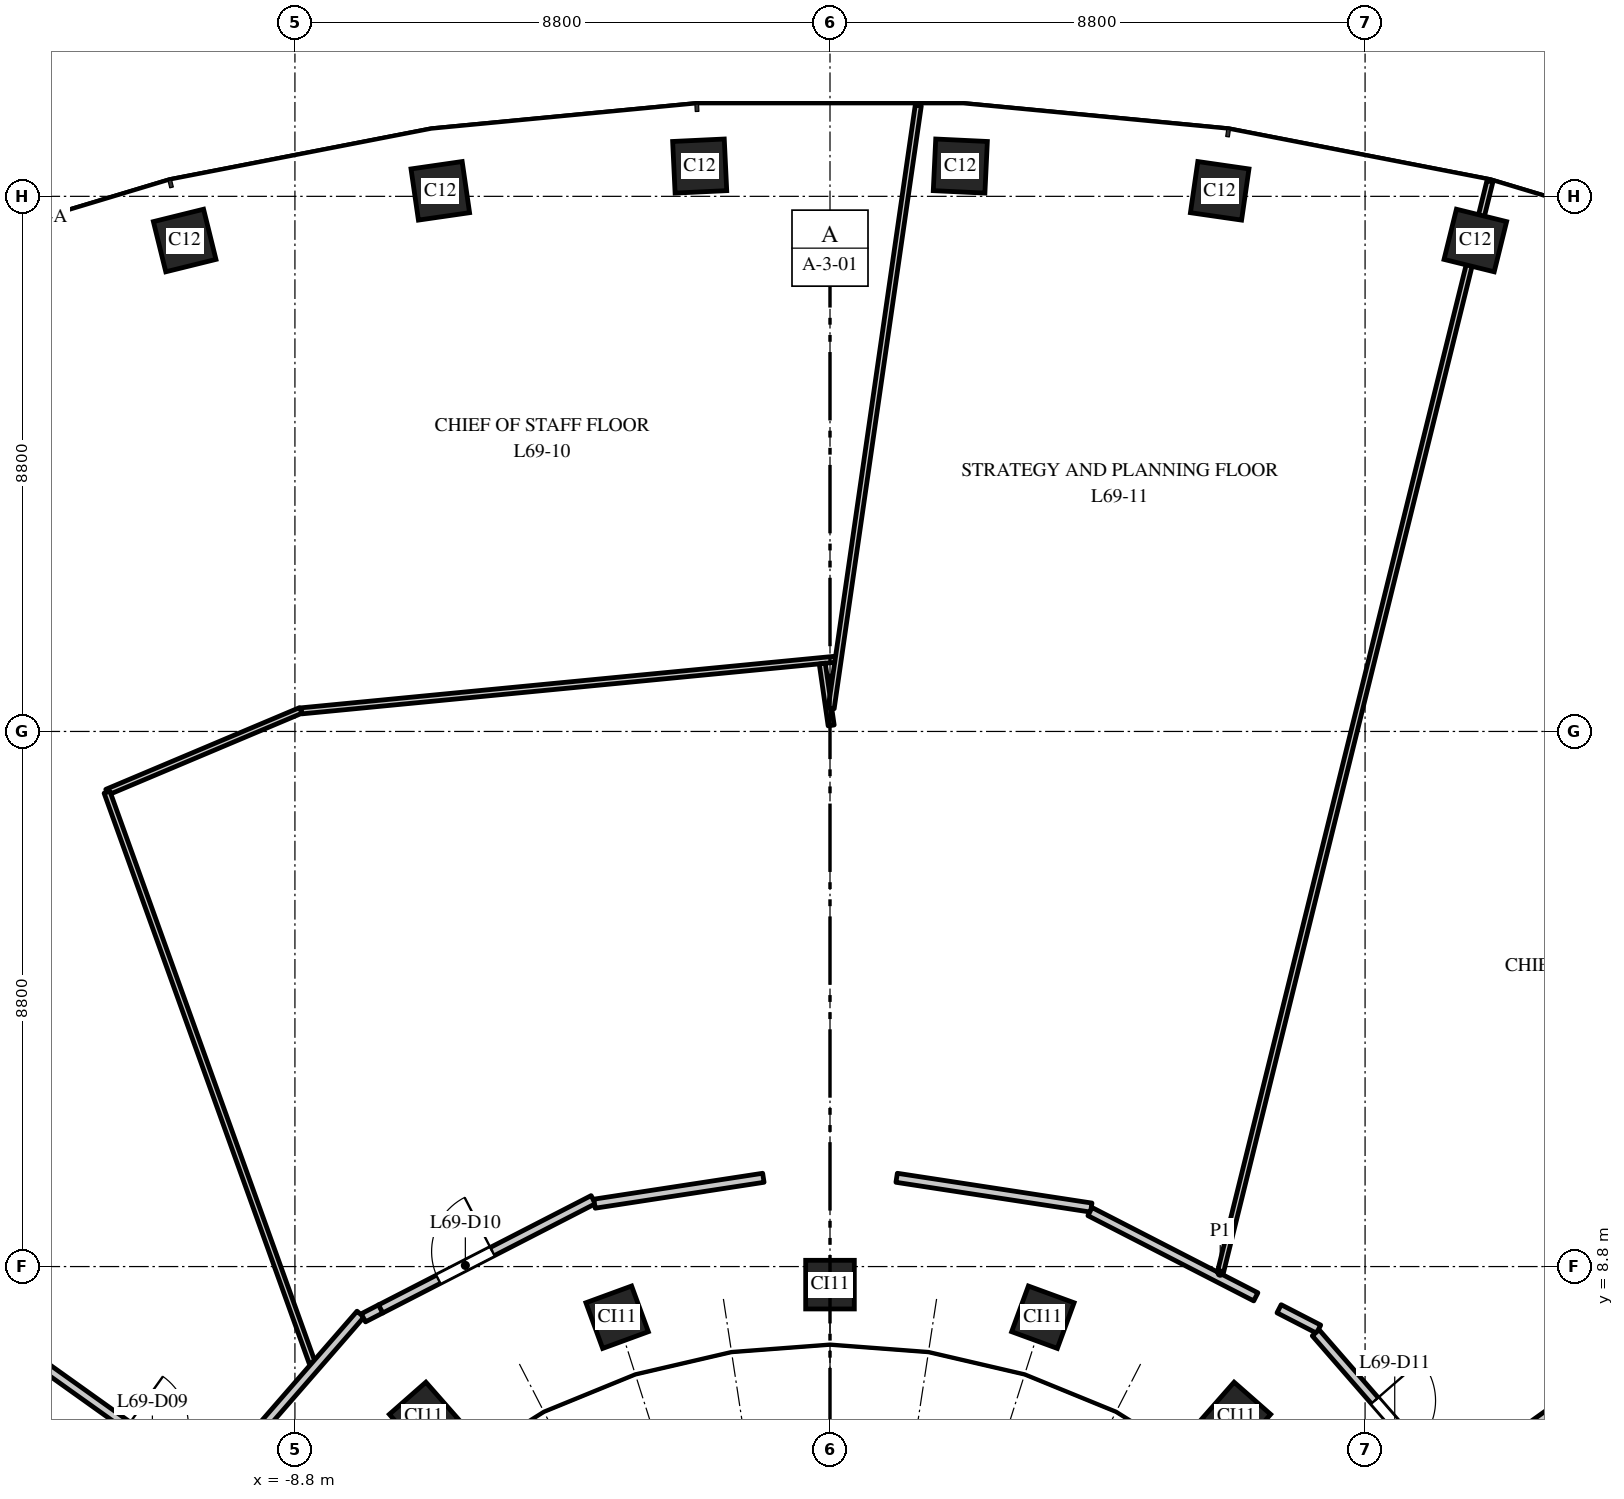
"""IFC4 building model, lengths in metres.
Left out: names, types, materials, properties, quantities, classifications, styles, units other than length and angle.
Written with IfcOpenShell. Run it as: python <this file> out.ifc"""

import sys

from ifc_helpers import new_model, si_unit, direction, frame, frame_2d, origin, origin_2d, place, context, subcontext, project, spatial, rectangle, extrude, element, fill, save


model = new_model("IFC4")
c1 = context("Model", 3, precision=1e-05, world=origin(), true_north=direction((0.0, 1.0)))
c2 = subcontext(c1, "Body", "Model", "MODEL_VIEW")
j1 = project(units=[si_unit("LENGTHUNIT", "METRE"), si_unit("PLANEANGLEUNIT", "RADIAN")], contexts=[c1])
p1 = place(None, origin())
s1 = spatial("IfcSite", under=j1, at=p1, CompositionType="ELEMENT")
p2 = place(p1, origin())
s2 = spatial("IfcBuilding", under=s1, at=p2, CompositionType="ELEMENT")
p3 = place(p2, frame((0.0, 0.0, 319.0)))
s3 = spatial("IfcBuildingStorey", under=s2, at=p3, CompositionType="ELEMENT", Elevation=319.0)
for number, where, z_axis, x_axis in (
    (1, (10.613, 25.674, 0.0), (0.0, 0.0, 1.0), (-0.971, 0.24, 0.0)),
    (2, (6.409, 26.491, 0.0), (0.0, 0.0, 1.0), (-0.99, 0.143, 0.0)),
    (3, (2.143, 26.898, 0.0), (0.0, 0.0, 1.0), (-0.999, 0.048, 0.0)),
    (4, (-2.143, 26.898, 0.0), (0.0, 0.0, 1.0), (-0.999, -0.048, 0.0)),
    (5, (-6.409, 26.491, 0.0), (0.0, 0.0, 1.0), (-0.99, -0.143, 0.0)),
    (6, (-10.613, 25.674, 0.0), (0.0, 0.0, 1.0), (-0.971, -0.24, 0.0)),
):
    element("IfcColumn", number, at=place(p3, frame(where, z_axis=z_axis, x_axis=x_axis)), inside=s3, PredefinedType="COLUMN", context=c2, shape_type="SweptSolid", body=[
        extrude(rectangle(XDim=0.85, YDim=0.85, at=origin_2d()), origin(), (0.0, 0.0, 1.0), 4.0),
    ])
for number, where, z_axis, x_axis in (
    (7, (6.682, 6.334, 0.0), (0.0, 0.0, 1.0), (-0.751, 0.66, 0.0)),
    (8, (3.501, 7.967, 0.0), (0.0, 0.0, 1.0), (-0.939, 0.344, 0.0)),
    (9, (0.0, 8.503, 0.0), (0.0, 0.0, 1.0), (-1.0, 0.0, 0.0)),
    (10, (-3.501, 7.967, 0.0), (0.0, 0.0, 1.0), (-0.939, -0.344, 0.0)),
    (11, (-6.682, 6.334, 0.0), (0.0, 0.0, 1.0), (-0.751, -0.66, 0.0)),
):
    element("IfcColumn", number, at=place(p3, frame(where, z_axis=z_axis, x_axis=x_axis)), inside=s3, PredefinedType="COLUMN", context=c2, shape_type="SweptSolid", body=[
        extrude(rectangle(XDim=0.8, YDim=0.8, at=origin_2d()), origin(), (0.0, 0.0, 1.0), 4.0),
    ])
p4 = place(p3, frame((-16.5, 7.744, 0.0), z_axis=(0.0, 0.0, 1.0), x_axis=(0.814095150002, -0.580731510032, 0.0)))
e12 = element("IfcWall", 12, at=p4, inside=s3, PredefinedType="PARTITIONING", context=c2, shape_type="SweptSolid", body=[
    extrude(rectangle(XDim=6.793, YDim=0.15, at=frame_2d((3.396, 0.0))), origin(), (0.0, 0.0, 1.0), 3.7),
])
p5 = place(p4, frame((3.776, 0.0, 0.0)))
e13 = element("IfcOpeningElement", 13, at=p5, cuts=e12, PredefinedType="OPENING", context=c2, shape_type="SweptSolid", body=[
    extrude(rectangle(XDim=1.0, YDim=2.1, at=frame_2d((0.5, 1.05))), frame((0.0, 0.085, 0.0), z_axis=(0.0, -1.0, 0.0), x_axis=(1.0, 0.0, 0.0)), (0.0, 0.0, 1.0), 0.17),
])
p6 = place(p3, frame((-15.063, 8.684, 0.0), z_axis=(0.0, 0.0, 1.0), x_axis=(0.814106730479, -0.580715275663, 0.0)))
e14 = element("IfcWall", 14, at=p6, inside=s3, PredefinedType="PARTITIONING", context=c2, shape_type="SweptSolid", body=[
    extrude(rectangle(XDim=5.964, YDim=0.15, at=frame_2d((2.982, 0.0))), origin(), (0.0, 0.0, 1.0), 3.7),
])
p7 = place(p6, frame((4.313, 0.0, 0.0)))
e15 = element("IfcOpeningElement", 15, at=p7, cuts=e14, PredefinedType="OPENING", context=c2, shape_type="SweptSolid", body=[
    extrude(rectangle(XDim=1.0, YDim=2.1, at=frame_2d((0.5, 1.05))), frame((0.0, 0.085, 0.0), z_axis=(0.0, -1.0, 0.0), x_axis=(1.0, 0.0, 0.0)), (0.0, 0.0, 1.0), 0.17),
])
p8 = place(p3, frame((-11.891, 16.602, 0.0), z_axis=(0.0, 0.0, 1.0), x_axis=(0.921418659734, 0.388571297827, 0.0)))
e16 = element("IfcWall", 16, at=p8, inside=s3, PredefinedType="PARTITIONING", context=c2, shape_type="SweptSolid", body=[
    extrude(rectangle(XDim=3.459, YDim=0.1, at=frame_2d((1.729, 0.0))), origin(), (0.0, 0.0, 1.0), 3.7),
])
p9 = place(p3, frame((-11.891, 16.602, 0.0), z_axis=(0.0, 0.0, 1.0), x_axis=(0.338375241261, -0.941011262473, 0.0)))
e17 = element("IfcWall", 17, at=p9, inside=s3, PredefinedType="PARTITIONING", context=c2, shape_type="SweptSolid", body=[
    extrude(rectangle(XDim=9.971, YDim=0.1, at=frame_2d((4.986, 0.0))), origin(), (0.0, 0.0, 1.0), 2.75),
])
p10 = place(p3, frame((-10.043, 5.351, 0.0), z_axis=(0.0, 0.0, 1.0), x_axis=(0.656624899746, 0.754217303589, 0.0)))
e18 = element("IfcWall", 18, at=p10, inside=s3, PredefinedType="PARTITIONING", context=c2, shape_type="SweptSolid", body=[
    extrude(rectangle(XDim=3.535, YDim=0.15, at=frame_2d((1.768, 0.0))), origin(), (0.0, 0.0, 1.0), 2.75),
])
p11 = place(p3, frame((-8.691, 17.939, 0.0), z_axis=(0.0, 0.0, 1.0), x_axis=(0.995363362458, 0.096186156361, 0.0)))
e19 = element("IfcWall", 19, at=p11, inside=s3, PredefinedType="PARTITIONING", context=c2, shape_type="SweptSolid", body=[
    extrude(rectangle(XDim=8.818, YDim=0.1, at=frame_2d((4.409, 0.0))), origin(), (0.0, 0.0, 1.0), 2.85),
])
p12 = place(p3, frame((-7.674, 7.957, 0.0), z_axis=(0.0, 0.0, 1.0), x_axis=(0.888323550582, 0.459218106657, 0.0)))
e20 = element("IfcWall", 20, at=p12, inside=s3, PredefinedType="PARTITIONING", context=c2, shape_type="SweptSolid", body=[
    extrude(rectangle(XDim=0.324, YDim=0.15, at=frame_2d((0.162, 0.0))), origin(), (0.0, 0.0, 1.0), 3.7),
])
p13 = place(p3, frame((-7.39, 8.103, 0.0), z_axis=(0.0, 0.0, 1.0), x_axis=(0.889390271787, 0.457148711527, 0.0)))
e21 = element("IfcWall", 21, at=p13, inside=s3, PredefinedType="PARTITIONING", context=c2, shape_type="SweptSolid", body=[
    extrude(rectangle(XDim=3.931, YDim=0.15, at=frame_2d((1.965, 0.0))), origin(), (0.0, 0.0, 1.0), 2.75),
])
p14 = place(p13, frame((1.066, 0.0, 0.0)))
e22 = element("IfcOpeningElement", 22, at=p14, cuts=e21, PredefinedType="OPENING", context=c2, shape_type="SweptSolid", body=[
    extrude(rectangle(XDim=1.0, YDim=2.1, at=frame_2d((0.5, 1.05))), frame((0.0, 0.085, 0.0), z_axis=(0.0, -1.0, 0.0), x_axis=(1.0, 0.0, 0.0)), (0.0, 0.0, 1.0), 0.17),
])
p15 = place(p3, frame((-3.873, 9.834, 0.0), z_axis=(0.0, 0.0, 1.0), x_axis=(0.988436903755, 0.151632738202, 0.0)))
e23 = element("IfcWall", 23, at=p15, inside=s3, PredefinedType="PARTITIONING", context=c2, shape_type="SweptSolid", body=[
    extrude(rectangle(XDim=2.81, YDim=0.15, at=frame_2d((1.405, 0.0))), origin(), (0.0, 0.0, 1.0), 3.7),
])
p16 = place(p3, frame((-0.127, 18.716, 0.0), z_axis=(0.0, 0.0, 1.0), x_axis=(0.142086612789, -0.989854228897, 0.0)))
e24 = element("IfcWall", 24, at=p16, inside=s3, PredefinedType="PARTITIONING", context=c2, shape_type="SweptSolid", body=[
    extrude(rectangle(XDim=1.028, YDim=0.1, at=frame_2d((0.514, 0.0))), origin(), (0.0, 0.0, 1.0), 3.7),
])
p17 = place(p3, frame((0.019, 17.981, 0.0), z_axis=(0.0, 0.0, 1.0), x_axis=(0.143055737962, 0.989714633536, 0.0)))
e25 = element("IfcWall", 25, at=p17, inside=s3, PredefinedType="PARTITIONING", context=c2, shape_type="SweptSolid", body=[
    extrude(rectangle(XDim=10.016, YDim=0.1, at=frame_2d((5.008, 0.0))), origin(), (0.0, 0.0, 1.0), 3.0),
])
p18 = place(p3, frame((1.096, 10.26, 0.0), z_axis=(0.0, 0.0, 1.0), x_axis=(0.988487324954, -0.151303695941, 0.0)))
e26 = element("IfcWall", 26, at=p18, inside=s3, PredefinedType="PARTITIONING", context=c2, shape_type="SweptSolid", body=[
    extrude(rectangle(XDim=3.239, YDim=0.15, at=frame_2d((1.619, 0.0))), origin(), (0.0, 0.0, 1.0), 2.85),
])
p19 = place(p3, frame((4.276, 9.704, 0.0), z_axis=(0.0, 0.0, 1.0), x_axis=(0.889338682752, -0.45724906491, 0.0)))
e27 = element("IfcWall", 27, at=p19, inside=s3, PredefinedType="PARTITIONING", context=c2, shape_type="SweptSolid", body=[
    extrude(rectangle(XDim=3.066, YDim=0.15, at=frame_2d((1.533, 0.0))), origin(), (0.0, 0.0, 1.0), 2.85),
])
p20 = place(p3, frame((6.418, 8.692, 0.0), z_axis=(0.0, 0.0, 1.0), x_axis=(0.239813663249, 0.970818936218, 0.0)))
e28 = element("IfcWall", 28, at=p20, inside=s3, PredefinedType="PARTITIONING", context=c2, shape_type="SweptSolid", body=[
    extrude(rectangle(XDim=18.494, YDim=0.1, at=frame_2d((9.247, 0.0))), origin(), (0.0, 0.0, 1.0), 2.85),
])
p21 = place(p3, frame((7.386, 8.106, 0.0), z_axis=(0.0, 0.0, 1.0), x_axis=(0.888883911649, -0.458132504426, 0.0)))
e29 = element("IfcWall", 29, at=p21, inside=s3, PredefinedType="PARTITIONING", context=c2, shape_type="SweptSolid", body=[
    extrude(rectangle(XDim=0.731, YDim=0.15, at=frame_2d((0.366, 0.0))), origin(), (0.0, 0.0, 1.0), 3.7),
])
p22 = place(p3, frame((7.988, 7.711, 0.0), z_axis=(0.0, 0.0, 1.0), x_axis=(0.656702027819, -0.754150148616, 0.0)))
e30 = element("IfcWall", 30, at=p22, inside=s3, PredefinedType="PARTITIONING", context=c2, shape_type="SweptSolid", body=[
    extrude(rectangle(XDim=3.129, YDim=0.15, at=frame_2d((1.564, 0.0))), origin(), (0.0, 0.0, 1.0), 2.75),
])
p23 = place(p22, frame((1.479, 0.0, 0.0)))
e31 = element("IfcOpeningElement", 31, at=p23, cuts=e30, PredefinedType="OPENING", context=c2, shape_type="SweptSolid", body=[
    extrude(rectangle(XDim=1.0, YDim=2.1, at=frame_2d((0.5, 1.05))), frame((0.0, 0.085, 0.0), z_axis=(0.0, -1.0, 0.0), x_axis=(1.0, 0.0, 0.0)), (0.0, 0.0, 1.0), 0.17),
])
p24 = place(p3, frame((10.208, 5.221, 0.0), z_axis=(0.0, 0.0, 1.0), x_axis=(0.814106730479, 0.580715275663, 0.0)))
e32 = element("IfcWall", 32, at=p24, inside=s3, PredefinedType="PARTITIONING", context=c2, shape_type="SweptSolid", body=[
    extrude(rectangle(XDim=5.964, YDim=0.15, at=frame_2d((2.982, 0.0))), origin(), (0.0, 0.0, 1.0), 2.75),
])
p25 = place(p3, frame((10.97, 3.799, 0.0), z_axis=(0.0, 0.0, 1.0), x_axis=(0.814095150002, 0.580731510032, 0.0)))
e33 = element("IfcWall", 33, at=p25, inside=s3, PredefinedType="PARTITIONING", context=c2, shape_type="SweptSolid", body=[
    extrude(rectangle(XDim=6.793, YDim=0.15, at=frame_2d((3.396, 0.0))), origin(), (0.0, 0.0, 1.0), 3.7),
])
p26 = place(p25, frame((4.4, 0.0, 0.0)))
e34 = element("IfcOpeningElement", 34, at=p26, cuts=e33, PredefinedType="OPENING", context=c2, shape_type="SweptSolid", body=[
    extrude(rectangle(XDim=1.0, YDim=2.1, at=frame_2d((0.5, 1.05))), frame((0.0, 0.085, 0.0), z_axis=(0.0, -1.0, 0.0), x_axis=(1.0, 0.0, 0.0)), (0.0, 0.0, 1.0), 0.17),
])
p27 = place(p14, origin())
e35 = element("IfcDoor", 35, at=p27, inside=s3, OperationType="SINGLE_SWING_RIGHT", PredefinedType="DOOR", context=c2, shape_type="SweptSolid", body=[
    extrude(rectangle(XDim=1.0, YDim=2.1, at=frame_2d((0.5, 1.05))), frame((0.0, 0.025, 0.0), z_axis=(0.0, -1.0, 0.0), x_axis=(1.0, 0.0, 0.0)), (0.0, 0.0, 1.0), 0.05),
])
fill(e22, e35)
p28 = place(p23, origin())
e36 = element("IfcDoor", 36, at=p28, inside=s3, OperationType="SINGLE_SWING_LEFT", PredefinedType="DOOR", context=c2, shape_type="SweptSolid", body=[
    extrude(rectangle(XDim=1.0, YDim=2.1, at=frame_2d((0.5, 1.05))), frame((0.0, 0.025, 0.0), z_axis=(0.0, -1.0, 0.0), x_axis=(1.0, 0.0, 0.0)), (0.0, 0.0, 1.0), 0.05),
])
fill(e31, e36)
save(model, sys.argv[1])
